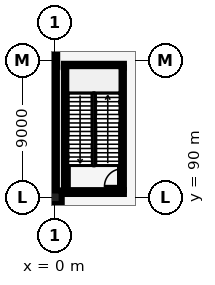
"""IFC4 building model, lengths in metres.
Left out: names, types, materials, properties, quantities, classifications, styles, units other than length and angle.
Written with IfcOpenShell. Run it as: python <this file> out.ifc"""

import sys

from ifc_helpers import new_model, si_unit, direction, frame, frame_2d, origin, origin_2d, place, context, subcontext, project, spatial, rectangle, i_section, extrude, element, fill, save


model = new_model("IFC4")
c1 = context("Model", 3, precision=1e-05, world=origin(), true_north=direction((0.0, 1.0)))
c2 = subcontext(c1, "Body", "Model", "MODEL_VIEW")
j1 = project(units=[si_unit("LENGTHUNIT", "METRE"), si_unit("PLANEANGLEUNIT", "RADIAN")], contexts=[c1])
p1 = place(None, origin())
s1 = spatial("IfcSite", under=j1, at=p1, CompositionType="ELEMENT")
p2 = place(p1, origin())
s2 = spatial("IfcBuilding", under=s1, at=p2, CompositionType="ELEMENT")
p3 = place(p2, origin())
s3 = spatial("IfcBuildingStorey", under=s2, at=p3, CompositionType="ELEMENT", Elevation=0.0)
p4 = place(p3, frame((0.0, 90.0, 0.0), z_axis=(0.0, 0.0, 1.0), x_axis=(1.0, 0.0, 0.0)))
e1 = element("IfcColumn", 1, at=p4, inside=s3, PredefinedType="COLUMN", context=c2, shape_type="SweptSolid", body=[
    extrude(rectangle(XDim=0.9, YDim=0.9, at=origin_2d()), origin(), (0.0, 0.0, 1.0), 6.0),
])
p5 = place(p3, frame((0.0, 99.0, 0.0), z_axis=(0.0, 0.0, 1.0), x_axis=(1.0, 0.0, 0.0)))
e2 = element("IfcColumn", 2, at=p5, inside=s3, PredefinedType="COLUMN", context=c2, shape_type="SweptSolid", body=[
    extrude(i_section(OverallWidth=0.303, OverallDepth=0.814, WebThickness=0.021, FlangeThickness=0.04, FilletRadius=0.03, at=origin_2d()), origin(), (0.0, 0.0, 1.0), 6.0),
])
p6 = place(p3, frame((0.0, 81.402, 0.0), z_axis=(0.0, 0.0, 1.0), x_axis=(0.0, 1.0, 0.0)))
e3 = element("IfcWall", 3, at=p6, inside=s3, PredefinedType="SOLIDWALL", context=c2, shape_type="SweptSolid", body=[
    extrude(rectangle(XDim=8.153, YDim=0.265, at=frame_2d((4.076, 0.0))), origin(), (0.0, 0.0, 1.0), 4.95),
])
p7 = place(p6, frame((2.648, 0.0, 0.0)))
e4 = element("IfcOpeningElement", 4, at=p7, cuts=e3, PredefinedType="OPENING", context=c2, shape_type="SweptSolid", body=[
    extrude(rectangle(XDim=1.9, YDim=2.2, at=frame_2d((0.95, 1.1))), frame((0.0, 0.142, 0.0), z_axis=(0.0, -1.0, 0.0), x_axis=(1.0, 0.0, 0.0)), (0.0, 0.0, 1.0), 0.285),
])
p8 = place(p3, frame((0.0, 90.445, 0.0), z_axis=(0.0, 0.0, 1.0), x_axis=(0.0, 1.0, 0.0)))
e5 = element("IfcWall", 5, at=p8, inside=s3, PredefinedType="SOLIDWALL", context=c2, shape_type="SweptSolid", body=[
    extrude(rectangle(XDim=8.153, YDim=0.265, at=frame_2d((4.076, 0.0))), origin(), (0.0, 0.0, 1.0), 4.95),
])
p9 = place(p8, frame((2.505, 0.0, 3.3)))
e6 = element("IfcOpeningElement", 6, at=p9, cuts=e5, PredefinedType="OPENING", context=c2, shape_type="SweptSolid", body=[
    extrude(rectangle(XDim=2.8, YDim=1.2, at=frame_2d((1.4, 0.6))), frame((0.0, 0.142, 0.0), z_axis=(0.0, -1.0, 0.0), x_axis=(1.0, 0.0, 0.0)), (0.0, 0.0, 1.0), 0.285),
])
p10 = place(p3, frame((0.0, 99.402, 0.0), z_axis=(0.0, 0.0, 1.0), x_axis=(0.0, 1.0, 0.0)))
e7 = element("IfcWall", 7, at=p10, inside=s3, PredefinedType="SOLIDWALL", context=c2, shape_type="SweptSolid", body=[
    extrude(rectangle(XDim=8.153, YDim=0.265, at=frame_2d((4.076, 0.0))), origin(), (0.0, 0.0, 1.0), 4.95),
])
p11 = place(p10, frame((2.648, 0.0, 0.0)))
e8 = element("IfcOpeningElement", 8, at=p11, cuts=e7, PredefinedType="OPENING", context=c2, shape_type="SweptSolid", body=[
    extrude(rectangle(XDim=2.5, YDim=2.5, at=frame_2d((1.25, 1.25))), frame((0.0, 0.142, 0.0), z_axis=(0.0, -1.0, 0.0), x_axis=(1.0, 0.0, 0.0)), (0.0, 0.0, 1.0), 0.285),
])
p12 = place(p3, frame((0.725, 90.47, 0.0), z_axis=(0.0, 0.0, 1.0), x_axis=(0.0, 1.0, 0.0)))
e9 = element("IfcWall", 9, at=p12, inside=s3, PredefinedType="SHEAR", context=c2, shape_type="SweptSolid", body=[
    extrude(rectangle(XDim=8.06, YDim=0.25, at=frame_2d((4.03, 0.0))), origin(), (0.0, 0.0, 1.0), 5.72),
])
p13 = place(p3, frame((4.415, 90.47, 0.0), z_axis=(0.0, 0.0, 1.0), x_axis=(0.0, 1.0, 0.0)))
e10 = element("IfcWall", 10, at=p13, inside=s3, PredefinedType="SHEAR", context=c2, shape_type="SweptSolid", body=[
    extrude(rectangle(XDim=8.06, YDim=0.25, at=frame_2d((4.03, 0.0))), origin(), (0.0, 0.0, 1.0), 5.72),
])
p14 = place(p13, frame((0.25, 0.0, 0.0)))
e11 = element("IfcOpeningElement", 11, at=p14, cuts=e10, PredefinedType="OPENING", context=c2, shape_type="SweptSolid", body=[
    extrude(rectangle(XDim=1.15, YDim=2.15, at=frame_2d((0.575, 1.075))), frame((0.0, 0.135, 0.0), z_axis=(0.0, -1.0, 0.0), x_axis=(1.0, 0.0, 0.0)), (0.0, 0.0, 1.0), 0.27),
])
for number, where, z_axis, x_axis in (
    (12, (0.6, 90.345, 0.0), (0.0, 0.0, 1.0), (1.0, 0.0, 0.0)),
    (13, (0.6, 98.655, 0.0), (0.0, 0.0, 1.0), (1.0, 0.0, 0.0)),
):
    element("IfcWall", number, at=place(p3, frame(where, z_axis=z_axis, x_axis=x_axis)), inside=s3, PredefinedType="SHEAR", context=c2, shape_type="SweptSolid", body=[
        extrude(rectangle(XDim=3.94, YDim=0.25, at=frame_2d((1.97, 0.0))), origin(), (0.0, 0.0, 1.0), 5.72),
    ])
p15 = place(p9, origin())
e14 = element("IfcWindow", 14, at=p15, inside=s3, PartitioningType="SINGLE_PANEL", PredefinedType="WINDOW", context=c2, shape_type="SweptSolid", body=[
    extrude(rectangle(XDim=2.8, YDim=1.2, at=frame_2d((1.4, 0.6))), frame((0.0, 0.03, 0.0), z_axis=(0.0, -1.0, 0.0), x_axis=(1.0, 0.0, 0.0)), (0.0, 0.0, 1.0), 0.06),
])
fill(e6, e14)
p16 = place(p14, origin())
e15 = element("IfcDoor", 15, at=p16, inside=s3, OperationType="SINGLE_SWING_LEFT", PredefinedType="DOOR", context=c2, shape_type="SweptSolid", body=[
    extrude(rectangle(XDim=1.15, YDim=2.15, at=frame_2d((0.575, 1.075))), frame((0.0, 0.025, 0.0), z_axis=(0.0, -1.0, 0.0), x_axis=(1.0, 0.0, 0.0)), (0.0, 0.0, 1.0), 0.05),
])
fill(e11, e15)
save(model, sys.argv[1])
